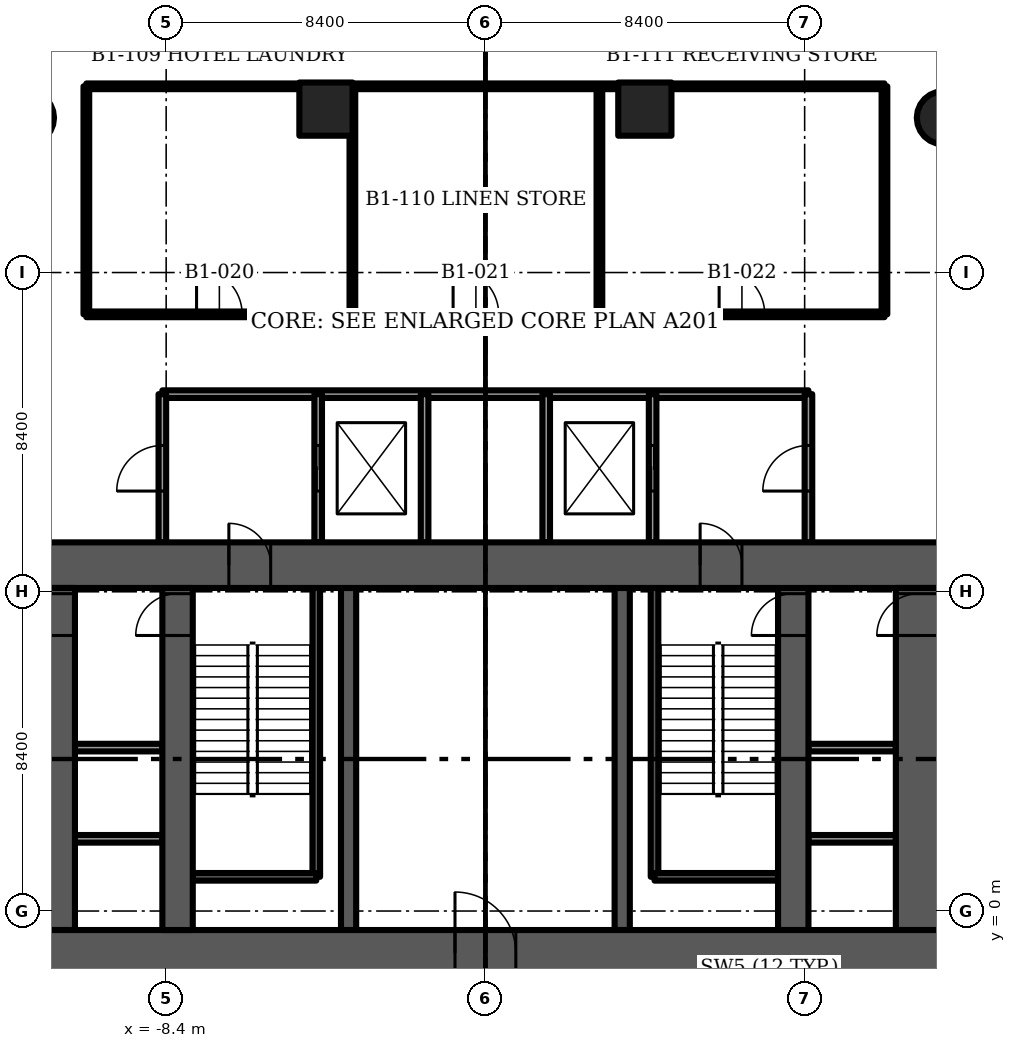
"""IFC4 building model, lengths in metres.
Left out: names, types, materials, properties, quantities, classifications, styles, units other than length and angle.
Written with IfcOpenShell. Run it as: python <this file> out.ifc"""

import sys

from ifc_helpers import new_model, si_unit, direction, frame, frame_2d, origin, origin_2d, place, context, subcontext, project, spatial, rectangle, circle, extrude, element, fill, save


model = new_model("IFC4")
c1 = context("Model", 3, precision=1e-05, world=origin(), true_north=direction((0.0, 1.0)))
c2 = subcontext(c1, "Body", "Model", "MODEL_VIEW")
j1 = project(units=[si_unit("LENGTHUNIT", "METRE"), si_unit("PLANEANGLEUNIT", "RADIAN")], contexts=[c1])
p1 = place(None, origin())
s1 = spatial("IfcSite", under=j1, at=p1, CompositionType="ELEMENT")
p2 = place(p1, origin())
s2 = spatial("IfcBuilding", under=s1, at=p2, CompositionType="ELEMENT")
p3 = place(p2, frame((0.0, 0.0, -5.0)))
s3 = spatial("IfcBuildingStorey", under=s2, at=p3, CompositionType="ELEMENT", Elevation=-5.0)
for number, where, z_axis, x_axis in (
    (1, (-12.051, 20.872, 0.0), (0.0, 0.0, 1.0), (1.0, 0.0, 0.0)),
    (2, (12.051, 20.872, 0.0), (0.0, 0.0, 1.0), (1.0, 0.0, 0.0)),
):
    element("IfcColumn", number, at=place(p3, frame(where, z_axis=z_axis, x_axis=x_axis)), inside=s3, PredefinedType="COLUMN", context=c2, shape_type="SweptSolid", body=[
        extrude(circle(Radius=0.7, at=origin_2d()), origin(), (0.0, 0.0, 1.0), 4.65),
    ])
for number, where, z_axis, x_axis in (
    (3, (4.195, 21.1, 0.0), (0.0, 0.0, 1.0), (1.0, 0.0, 0.0)),
    (4, (-4.195, 21.1, 0.0), (0.0, 0.0, 1.0), (1.0, 0.0, 0.0)),
):
    element("IfcColumn", number, at=place(p3, frame(where, z_axis=z_axis, x_axis=x_axis)), inside=s3, PredefinedType="COLUMN", context=c2, shape_type="SweptSolid", body=[
        extrude(rectangle(XDim=1.4, YDim=1.4, at=origin_2d()), origin(), (0.0, 0.0, 1.0), 4.65),
    ])
p4 = place(p3, frame((-12.0, -1.1, 0.0), z_axis=(0.0, 0.0, 1.0), x_axis=(1.0, 0.0, 0.0)))
e5 = element("IfcWall", 5, at=p4, inside=s3, PredefinedType="SHEAR", context=c2, shape_type="SweptSolid", body=[
    extrude(rectangle(XDim=24.0, YDim=1.2, at=frame_2d((12.0, 0.0))), origin(), (0.0, 0.0, 1.0), 4.65),
])
p5 = place(p4, frame((11.2, 0.0, 0.0)))
e6 = element("IfcOpeningElement", 6, at=p5, cuts=e5, PredefinedType="OPENING", context=c2, shape_type="SweptSolid", body=[
    extrude(rectangle(XDim=1.6, YDim=2.1, at=frame_2d((0.8, 1.05))), frame((0.0, 0.6, 0.0), z_axis=(0.0, -1.0, 0.0), x_axis=(1.0, 0.0, 0.0)), (0.0, 0.0, 1.0), 1.2),
])
p6 = place(p3, frame((-12.0, 9.1, 0.0), z_axis=(0.0, 0.0, 1.0), x_axis=(1.0, 0.0, 0.0)))
e7 = element("IfcWall", 7, at=p6, inside=s3, PredefinedType="SHEAR", context=c2, shape_type="SweptSolid", body=[
    extrude(rectangle(XDim=24.0, YDim=1.2, at=frame_2d((12.0, 0.0))), origin(), (0.0, 0.0, 1.0), 4.65),
])
p7 = place(p6, frame((5.25, 0.0, 0.0)))
e8 = element("IfcOpeningElement", 8, at=p7, cuts=e7, PredefinedType="OPENING", context=c2, shape_type="SweptSolid", body=[
    extrude(rectangle(XDim=1.1, YDim=2.1, at=frame_2d((0.55, 1.05))), frame((0.0, 0.6, 0.0), z_axis=(0.0, -1.0, 0.0), x_axis=(1.0, 0.0, 0.0)), (0.0, 0.0, 1.0), 1.2),
])
p8 = place(p6, frame((17.65, 0.0, 0.0)))
e9 = element("IfcOpeningElement", 9, at=p8, cuts=e7, PredefinedType="OPENING", context=c2, shape_type="SweptSolid", body=[
    extrude(rectangle(XDim=1.1, YDim=2.1, at=frame_2d((0.55, 1.05))), frame((0.0, 0.6, 0.0), z_axis=(0.0, -1.0, 0.0), x_axis=(1.0, 0.0, 0.0)), (0.0, 0.0, 1.0), 1.2),
])
p9 = place(p3, frame((-8.1, -0.5, 0.0), z_axis=(0.0, 0.0, 1.0), x_axis=(0.0, 1.0, 0.0)))
e10 = element("IfcWall", 10, at=p9, inside=s3, PredefinedType="SHEAR", context=c2, shape_type="SweptSolid", body=[
    extrude(rectangle(XDim=9.0, YDim=0.8, at=frame_2d((4.5, 0.0))), origin(), (0.0, 0.0, 1.0), 4.65),
])
p10 = place(p9, frame((7.75, 0.0, 0.0)))
e11 = element("IfcOpeningElement", 11, at=p10, cuts=e10, PredefinedType="OPENING", context=c2, shape_type="SweptSolid", body=[
    extrude(rectangle(XDim=1.1, YDim=2.1, at=frame_2d((0.55, 1.05))), frame((0.0, 0.4, 0.0), z_axis=(0.0, -1.0, 0.0), x_axis=(1.0, 0.0, 0.0)), (0.0, 0.0, 1.0), 0.8),
])
p11 = place(p3, frame((8.1, -0.5, 0.0), z_axis=(0.0, 0.0, 1.0), x_axis=(0.0, 1.0, 0.0)))
e12 = element("IfcWall", 12, at=p11, inside=s3, PredefinedType="SHEAR", context=c2, shape_type="SweptSolid", body=[
    extrude(rectangle(XDim=9.0, YDim=0.8, at=frame_2d((4.5, 0.0))), origin(), (0.0, 0.0, 1.0), 4.65),
])
p12 = place(p11, frame((7.75, 0.0, 0.0)))
e13 = element("IfcOpeningElement", 13, at=p12, cuts=e12, PredefinedType="OPENING", context=c2, shape_type="SweptSolid", body=[
    extrude(rectangle(XDim=1.1, YDim=2.1, at=frame_2d((0.55, 1.05))), frame((0.0, 0.4, 0.0), z_axis=(0.0, -1.0, 0.0), x_axis=(1.0, 0.0, 0.0)), (0.0, 0.0, 1.0), 0.8),
])
for number, where, z_axis, x_axis in (
    (14, (-3.6, -0.5, 0.0), (0.0, 0.0, 1.0), (0.0, 1.0, 0.0)),
    (15, (3.6, -0.5, 0.0), (0.0, 0.0, 1.0), (0.0, 1.0, 0.0)),
):
    element("IfcWall", number, at=place(p3, frame(where, z_axis=z_axis, x_axis=x_axis)), inside=s3, PredefinedType="SHEAR", context=c2, shape_type="SweptSolid", body=[
        extrude(rectangle(XDim=9.0, YDim=0.4, at=frame_2d((4.5, 0.0))), origin(), (0.0, 0.0, 1.0), 4.65),
    ])
p13 = place(p3, frame((-11.4, -0.5, 0.0), z_axis=(0.0, 0.0, 1.0), x_axis=(0.0, 1.0, 0.0)))
e16 = element("IfcWall", 16, at=p13, inside=s3, PredefinedType="SHEAR", context=c2, shape_type="SweptSolid", body=[
    extrude(rectangle(XDim=9.0, YDim=1.2, at=frame_2d((4.5, 0.0))), origin(), (0.0, 0.0, 1.0), 4.65),
])
p14 = place(p13, frame((7.75, 0.0, 0.0)))
e17 = element("IfcOpeningElement", 17, at=p14, cuts=e16, PredefinedType="OPENING", context=c2, shape_type="SweptSolid", body=[
    extrude(rectangle(XDim=1.1, YDim=2.1, at=frame_2d((0.55, 1.05))), frame((0.0, 0.6, 0.0), z_axis=(0.0, -1.0, 0.0), x_axis=(1.0, 0.0, 0.0)), (0.0, 0.0, 1.0), 1.2),
])
p15 = place(p3, frame((11.4, -0.5, 0.0), z_axis=(0.0, 0.0, 1.0), x_axis=(0.0, 1.0, 0.0)))
e18 = element("IfcWall", 18, at=p15, inside=s3, PredefinedType="SHEAR", context=c2, shape_type="SweptSolid", body=[
    extrude(rectangle(XDim=9.0, YDim=1.2, at=frame_2d((4.5, 0.0))), origin(), (0.0, 0.0, 1.0), 4.65),
])
p16 = place(p15, frame((7.75, 0.0, 0.0)))
e19 = element("IfcOpeningElement", 19, at=p16, cuts=e18, PredefinedType="OPENING", context=c2, shape_type="SweptSolid", body=[
    extrude(rectangle(XDim=1.1, YDim=2.1, at=frame_2d((0.55, 1.05))), frame((0.0, 0.6, 0.0), z_axis=(0.0, -1.0, 0.0), x_axis=(1.0, 0.0, 0.0)), (0.0, 0.0, 1.0), 1.2),
])
p17 = place(p3, frame((-4.45, 0.9, 0.0), z_axis=(0.0, 0.0, 1.0), x_axis=(0.0, 1.0, 0.0)))
e20 = element("IfcWall", 20, at=p17, inside=s3, PredefinedType="SOLIDWALL", context=c2, shape_type="SweptSolid", body=[
    extrude(rectangle(XDim=7.6, YDim=0.2, at=frame_2d((3.8, 0.0))), origin(), (0.0, 0.0, 1.0), 4.65),
])
p18 = place(p3, frame((-7.7, 0.9, 0.0), z_axis=(0.0, 0.0, 1.0), x_axis=(1.0, 0.0, 0.0)))
e21 = element("IfcWall", 21, at=p18, inside=s3, PredefinedType="SOLIDWALL", context=c2, shape_type="SweptSolid", body=[
    extrude(rectangle(XDim=3.25, YDim=0.2, at=frame_2d((1.625, 0.0))), origin(), (0.0, 0.0, 1.0), 4.65),
])
p19 = place(p3, frame((4.45, 0.9, 0.0), z_axis=(0.0, 0.0, 1.0), x_axis=(0.0, 1.0, 0.0)))
e22 = element("IfcWall", 22, at=p19, inside=s3, PredefinedType="SOLIDWALL", context=c2, shape_type="SweptSolid", body=[
    extrude(rectangle(XDim=7.6, YDim=0.2, at=frame_2d((3.8, 0.0))), origin(), (0.0, 0.0, 1.0), 4.65),
])
p20 = place(p3, frame((4.45, 0.9, 0.0), z_axis=(0.0, 0.0, 1.0), x_axis=(1.0, 0.0, 0.0)))
e23 = element("IfcWall", 23, at=p20, inside=s3, PredefinedType="SOLIDWALL", context=c2, shape_type="SweptSolid", body=[
    extrude(rectangle(XDim=3.25, YDim=0.2, at=frame_2d((1.625, 0.0))), origin(), (0.0, 0.0, 1.0), 4.65),
])
p21 = place(p3, frame((-8.5, 13.6, 0.0), z_axis=(0.0, 0.0, 1.0), x_axis=(1.0, 0.0, 0.0)))
e24 = element("IfcWall", 24, at=p21, inside=s3, PredefinedType="PARTITIONING", context=c2, shape_type="SweptSolid", body=[
    extrude(rectangle(XDim=17.0, YDim=0.2, at=frame_2d((8.5, 0.0))), origin(), (0.0, 0.0, 1.0), 4.65),
])
p22 = place(p3, frame((-8.5, 9.7, 0.0), z_axis=(0.0, 0.0, 1.0), x_axis=(0.0, 1.0, 0.0)))
e25 = element("IfcWall", 25, at=p22, inside=s3, PredefinedType="PARTITIONING", context=c2, shape_type="SweptSolid", body=[
    extrude(rectangle(XDim=3.9, YDim=0.2, at=frame_2d((1.95, 0.0))), origin(), (0.0, 0.0, 1.0), 4.65),
])
p23 = place(p22, frame((1.35, 0.0, 0.0)))
e26 = element("IfcOpeningElement", 26, at=p23, cuts=e25, PredefinedType="OPENING", context=c2, shape_type="SweptSolid", body=[
    extrude(rectangle(XDim=1.2, YDim=2.1, at=frame_2d((0.6, 1.05))), frame((0.0, 0.1, 0.0), z_axis=(0.0, -1.0, 0.0), x_axis=(1.0, 0.0, 0.0)), (0.0, 0.0, 1.0), 0.2),
])
p24 = place(p3, frame((8.5, 9.7, 0.0), z_axis=(0.0, 0.0, 1.0), x_axis=(0.0, 1.0, 0.0)))
e27 = element("IfcWall", 27, at=p24, inside=s3, PredefinedType="PARTITIONING", context=c2, shape_type="SweptSolid", body=[
    extrude(rectangle(XDim=3.9, YDim=0.2, at=frame_2d((1.95, 0.0))), origin(), (0.0, 0.0, 1.0), 4.65),
])
p25 = place(p24, frame((1.35, 0.0, 0.0)))
e28 = element("IfcOpeningElement", 28, at=p25, cuts=e27, PredefinedType="OPENING", context=c2, shape_type="SweptSolid", body=[
    extrude(rectangle(XDim=1.2, YDim=2.1, at=frame_2d((0.6, 1.05))), frame((0.0, 0.1, 0.0), z_axis=(0.0, -1.0, 0.0), x_axis=(1.0, 0.0, 0.0)), (0.0, 0.0, 1.0), 0.2),
])
p26 = place(p3, frame((-4.4, 9.7, 0.0), z_axis=(0.0, 0.0, 1.0), x_axis=(0.0, 1.0, 0.0)))
e29 = element("IfcWall", 29, at=p26, inside=s3, PredefinedType="PARTITIONING", context=c2, shape_type="SweptSolid", body=[
    extrude(rectangle(XDim=3.9, YDim=0.2, at=frame_2d((1.95, 0.0))), origin(), (0.0, 0.0, 1.0), 4.65),
])
p27 = place(p26, frame((1.35, 0.0, 0.0)))
e30 = element("IfcOpeningElement", 30, at=p27, cuts=e29, PredefinedType="OPENING", context=c2, shape_type="SweptSolid", body=[
    extrude(rectangle(XDim=1.2, YDim=2.1, at=frame_2d((0.6, 1.05))), frame((0.0, 0.1, 0.0), z_axis=(0.0, -1.0, 0.0), x_axis=(1.0, 0.0, 0.0)), (0.0, 0.0, 1.0), 0.2),
])
p28 = place(p3, frame((4.4, 9.7, 0.0), z_axis=(0.0, 0.0, 1.0), x_axis=(0.0, 1.0, 0.0)))
e31 = element("IfcWall", 31, at=p28, inside=s3, PredefinedType="PARTITIONING", context=c2, shape_type="SweptSolid", body=[
    extrude(rectangle(XDim=3.9, YDim=0.2, at=frame_2d((1.95, 0.0))), origin(), (0.0, 0.0, 1.0), 4.65),
])
p29 = place(p28, frame((1.35, 0.0, 0.0)))
e32 = element("IfcOpeningElement", 32, at=p29, cuts=e31, PredefinedType="OPENING", context=c2, shape_type="SweptSolid", body=[
    extrude(rectangle(XDim=1.2, YDim=2.1, at=frame_2d((0.6, 1.05))), frame((0.0, 0.1, 0.0), z_axis=(0.0, -1.0, 0.0), x_axis=(1.0, 0.0, 0.0)), (0.0, 0.0, 1.0), 0.2),
])
for number, where, z_axis, x_axis in (
    (33, (-1.6, 9.7, 0.0), (0.0, 0.0, 1.0), (0.0, 1.0, 0.0)),
    (34, (1.6, 9.7, 0.0), (0.0, 0.0, 1.0), (0.0, 1.0, 0.0)),
):
    element("IfcWall", number, at=place(p3, frame(where, z_axis=z_axis, x_axis=x_axis)), inside=s3, PredefinedType="PARTITIONING", context=c2, shape_type="SweptSolid", body=[
        extrude(rectangle(XDim=3.9, YDim=0.2, at=frame_2d((1.95, 0.0))), origin(), (0.0, 0.0, 1.0), 4.65),
    ])
for number, where, z_axis, x_axis in (
    (35, (-10.8, 1.9, 0.0), (0.0, 0.0, 1.0), (1.0, 0.0, 0.0)),
    (36, (-10.8, 4.3, 0.0), (0.0, 0.0, 1.0), (1.0, 0.0, 0.0)),
    (37, (8.5, 1.9, 0.0), (0.0, 0.0, 1.0), (1.0, 0.0, 0.0)),
    (38, (8.5, 4.3, 0.0), (0.0, 0.0, 1.0), (1.0, 0.0, 0.0)),
):
    element("IfcWall", number, at=place(p3, frame(where, z_axis=z_axis, x_axis=x_axis)), inside=s3, PredefinedType="PARTITIONING", context=c2, shape_type="SweptSolid", body=[
        extrude(rectangle(XDim=2.3, YDim=0.2, at=frame_2d((1.15, 0.0))), origin(), (0.0, 0.0, 1.0), 4.65),
    ])
p30 = place(p3, frame((-10.5, 15.7, 0.0), z_axis=(0.0, 0.0, 1.0), x_axis=(1.0, 0.0, 0.0)))
e39 = element("IfcWall", 39, at=p30, inside=s3, PredefinedType="PARTITIONING", context=c2, shape_type="SweptSolid", body=[
    extrude(rectangle(XDim=21.0, YDim=0.15, at=frame_2d((10.5, 0.0))), origin(), (0.0, 0.0, 1.0), 4.65),
])
p31 = place(p30, frame((2.9, 0.0, 0.0)))
e40 = element("IfcOpeningElement", 40, at=p31, cuts=e39, PredefinedType="OPENING", context=c2, shape_type="SweptSolid", body=[
    extrude(rectangle(XDim=1.2, YDim=2.1, at=frame_2d((0.6, 1.05))), frame((0.0, 0.075, 0.0), z_axis=(0.0, -1.0, 0.0), x_axis=(1.0, 0.0, 0.0)), (0.0, 0.0, 1.0), 0.15),
])
p32 = place(p30, frame((9.65, 0.0, 0.0)))
e41 = element("IfcOpeningElement", 41, at=p32, cuts=e39, PredefinedType="OPENING", context=c2, shape_type="SweptSolid", body=[
    extrude(rectangle(XDim=1.2, YDim=2.1, at=frame_2d((0.6, 1.05))), frame((0.0, 0.075, 0.0), z_axis=(0.0, -1.0, 0.0), x_axis=(1.0, 0.0, 0.0)), (0.0, 0.0, 1.0), 0.15),
])
p33 = place(p30, frame((16.65, 0.0, 0.0)))
e42 = element("IfcOpeningElement", 42, at=p33, cuts=e39, PredefinedType="OPENING", context=c2, shape_type="SweptSolid", body=[
    extrude(rectangle(XDim=1.2, YDim=2.1, at=frame_2d((0.6, 1.05))), frame((0.0, 0.075, 0.0), z_axis=(0.0, -1.0, 0.0), x_axis=(1.0, 0.0, 0.0)), (0.0, 0.0, 1.0), 0.15),
])
p34 = place(p3, frame((-10.5, 21.7, 0.0), z_axis=(0.0, 0.0, 1.0), x_axis=(1.0, 0.0, 0.0)))
e43 = element("IfcWall", 43, at=p34, inside=s3, PredefinedType="PARTITIONING", context=c2, shape_type="SweptSolid", body=[
    extrude(rectangle(XDim=21.0, YDim=0.15, at=frame_2d((10.5, 0.0))), origin(), (0.0, 0.0, 1.0), 4.65),
])
for number, where, z_axis, x_axis in (
    (44, (-10.5, 15.7, 0.0), (0.0, 0.0, 1.0), (0.0, 1.0, 0.0)),
    (45, (-3.5, 15.7, 0.0), (0.0, 0.0, 1.0), (0.0, 1.0, 0.0)),
    (46, (3.0, 15.7, 0.0), (0.0, 0.0, 1.0), (0.0, 1.0, 0.0)),
    (47, (10.5, 15.7, 0.0), (0.0, 0.0, 1.0), (0.0, 1.0, 0.0)),
):
    element("IfcWall", number, at=place(p3, frame(where, z_axis=z_axis, x_axis=x_axis)), inside=s3, PredefinedType="PARTITIONING", context=c2, shape_type="SweptSolid", body=[
        extrude(rectangle(XDim=6.0, YDim=0.15, at=frame_2d((3.0, 0.0))), origin(), (0.0, 0.0, 1.0), 4.65),
    ])
p35 = place(p5, origin())
e48 = element("IfcDoor", 48, at=p35, inside=s3, OperationType="DOUBLE_DOOR_SINGLE_SWING", PredefinedType="DOOR", context=c2, shape_type="SweptSolid", body=[
    extrude(rectangle(XDim=1.6, YDim=2.1, at=frame_2d((0.8, 1.05))), frame((0.0, 0.025, 0.0), z_axis=(0.0, -1.0, 0.0), x_axis=(1.0, 0.0, 0.0)), (0.0, 0.0, 1.0), 0.05),
])
fill(e6, e48)
p36 = place(p7, origin())
e49 = element("IfcDoor", 49, at=p36, inside=s3, OperationType="SINGLE_SWING_LEFT", PredefinedType="DOOR", context=c2, shape_type="SweptSolid", body=[
    extrude(rectangle(XDim=1.1, YDim=2.1, at=frame_2d((0.55, 1.05))), frame((0.0, 0.025, 0.0), z_axis=(0.0, -1.0, 0.0), x_axis=(1.0, 0.0, 0.0)), (0.0, 0.0, 1.0), 0.05),
])
fill(e8, e49)
p37 = place(p10, origin())
e50 = element("IfcDoor", 50, at=p37, inside=s3, OperationType="SINGLE_SWING_RIGHT", PredefinedType="DOOR", context=c2, shape_type="SweptSolid", body=[
    extrude(rectangle(XDim=1.1, YDim=2.1, at=frame_2d((0.55, 1.05))), frame((0.0, 0.025, 0.0), z_axis=(0.0, -1.0, 0.0), x_axis=(1.0, 0.0, 0.0)), (0.0, 0.0, 1.0), 0.05),
])
fill(e11, e50)
p38 = place(p8, origin())
e51 = element("IfcDoor", 51, at=p38, inside=s3, OperationType="SINGLE_SWING_RIGHT", PredefinedType="DOOR", context=c2, shape_type="SweptSolid", body=[
    extrude(rectangle(XDim=1.1, YDim=2.1, at=frame_2d((0.55, 1.05))), frame((0.0, 0.025, 0.0), z_axis=(0.0, -1.0, 0.0), x_axis=(1.0, 0.0, 0.0)), (0.0, 0.0, 1.0), 0.05),
])
fill(e9, e51)
p39 = place(p12, origin())
e52 = element("IfcDoor", 52, at=p39, inside=s3, OperationType="SINGLE_SWING_LEFT", PredefinedType="DOOR", context=c2, shape_type="SweptSolid", body=[
    extrude(rectangle(XDim=1.1, YDim=2.1, at=frame_2d((0.55, 1.05))), frame((0.0, 0.025, 0.0), z_axis=(0.0, -1.0, 0.0), x_axis=(1.0, 0.0, 0.0)), (0.0, 0.0, 1.0), 0.05),
])
fill(e13, e52)
p40 = place(p27, origin())
e53 = element("IfcDoor", 53, at=p40, inside=s3, OperationType="SLIDING_TO_LEFT", PredefinedType="DOOR", context=c2, shape_type="SweptSolid", body=[
    extrude(rectangle(XDim=1.2, YDim=2.1, at=frame_2d((0.6, 1.05))), frame((0.0, 0.025, 0.0), z_axis=(0.0, -1.0, 0.0), x_axis=(1.0, 0.0, 0.0)), (0.0, 0.0, 1.0), 0.05),
])
fill(e30, e53)
p41 = place(p23, origin())
e54 = element("IfcDoor", 54, at=p41, inside=s3, OperationType="SINGLE_SWING_LEFT", PredefinedType="DOOR", context=c2, shape_type="SweptSolid", body=[
    extrude(rectangle(XDim=1.2, YDim=2.1, at=frame_2d((0.6, 1.05))), frame((0.0, 0.025, 0.0), z_axis=(0.0, -1.0, 0.0), x_axis=(1.0, 0.0, 0.0)), (0.0, 0.0, 1.0), 0.05),
])
fill(e26, e54)
p42 = place(p29, origin())
e55 = element("IfcDoor", 55, at=p42, inside=s3, OperationType="SLIDING_TO_LEFT", PredefinedType="DOOR", context=c2, shape_type="SweptSolid", body=[
    extrude(rectangle(XDim=1.2, YDim=2.1, at=frame_2d((0.6, 1.05))), frame((0.0, 0.025, 0.0), z_axis=(0.0, -1.0, 0.0), x_axis=(1.0, 0.0, 0.0)), (0.0, 0.0, 1.0), 0.05),
])
fill(e32, e55)
p43 = place(p25, origin())
e56 = element("IfcDoor", 56, at=p43, inside=s3, OperationType="SINGLE_SWING_LEFT", PredefinedType="DOOR", context=c2, shape_type="SweptSolid", body=[
    extrude(rectangle(XDim=1.2, YDim=2.1, at=frame_2d((0.6, 1.05))), frame((0.0, 0.025, 0.0), z_axis=(0.0, -1.0, 0.0), x_axis=(1.0, 0.0, 0.0)), (0.0, 0.0, 1.0), 0.05),
])
fill(e28, e56)
p44 = place(p14, origin())
e57 = element("IfcDoor", 57, at=p44, inside=s3, OperationType="SINGLE_SWING_LEFT", PredefinedType="DOOR", context=c2, shape_type="SweptSolid", body=[
    extrude(rectangle(XDim=1.1, YDim=2.1, at=frame_2d((0.55, 1.05))), frame((0.0, 0.025, 0.0), z_axis=(0.0, -1.0, 0.0), x_axis=(1.0, 0.0, 0.0)), (0.0, 0.0, 1.0), 0.05),
])
fill(e17, e57)
p45 = place(p16, origin())
e58 = element("IfcDoor", 58, at=p45, inside=s3, OperationType="SINGLE_SWING_RIGHT", PredefinedType="DOOR", context=c2, shape_type="SweptSolid", body=[
    extrude(rectangle(XDim=1.1, YDim=2.1, at=frame_2d((0.55, 1.05))), frame((0.0, 0.025, 0.0), z_axis=(0.0, -1.0, 0.0), x_axis=(1.0, 0.0, 0.0)), (0.0, 0.0, 1.0), 0.05),
])
fill(e19, e58)
p46 = place(p31, origin())
e59 = element("IfcDoor", 59, at=p46, inside=s3, OperationType="SINGLE_SWING_LEFT", PredefinedType="DOOR", context=c2, shape_type="SweptSolid", body=[
    extrude(rectangle(XDim=1.2, YDim=2.1, at=frame_2d((0.6, 1.05))), frame((0.0, 0.025, 0.0), z_axis=(0.0, -1.0, 0.0), x_axis=(1.0, 0.0, 0.0)), (0.0, 0.0, 1.0), 0.05),
])
fill(e40, e59)
p47 = place(p32, origin())
e60 = element("IfcDoor", 60, at=p47, inside=s3, OperationType="SINGLE_SWING_LEFT", PredefinedType="DOOR", context=c2, shape_type="SweptSolid", body=[
    extrude(rectangle(XDim=1.2, YDim=2.1, at=frame_2d((0.6, 1.05))), frame((0.0, 0.025, 0.0), z_axis=(0.0, -1.0, 0.0), x_axis=(1.0, 0.0, 0.0)), (0.0, 0.0, 1.0), 0.05),
])
fill(e41, e60)
p48 = place(p33, origin())
e61 = element("IfcDoor", 61, at=p48, inside=s3, OperationType="SINGLE_SWING_LEFT", PredefinedType="DOOR", context=c2, shape_type="SweptSolid", body=[
    extrude(rectangle(XDim=1.2, YDim=2.1, at=frame_2d((0.6, 1.05))), frame((0.0, 0.025, 0.0), z_axis=(0.0, -1.0, 0.0), x_axis=(1.0, 0.0, 0.0)), (0.0, 0.0, 1.0), 0.05),
])
fill(e42, e61)
save(model, sys.argv[1])
